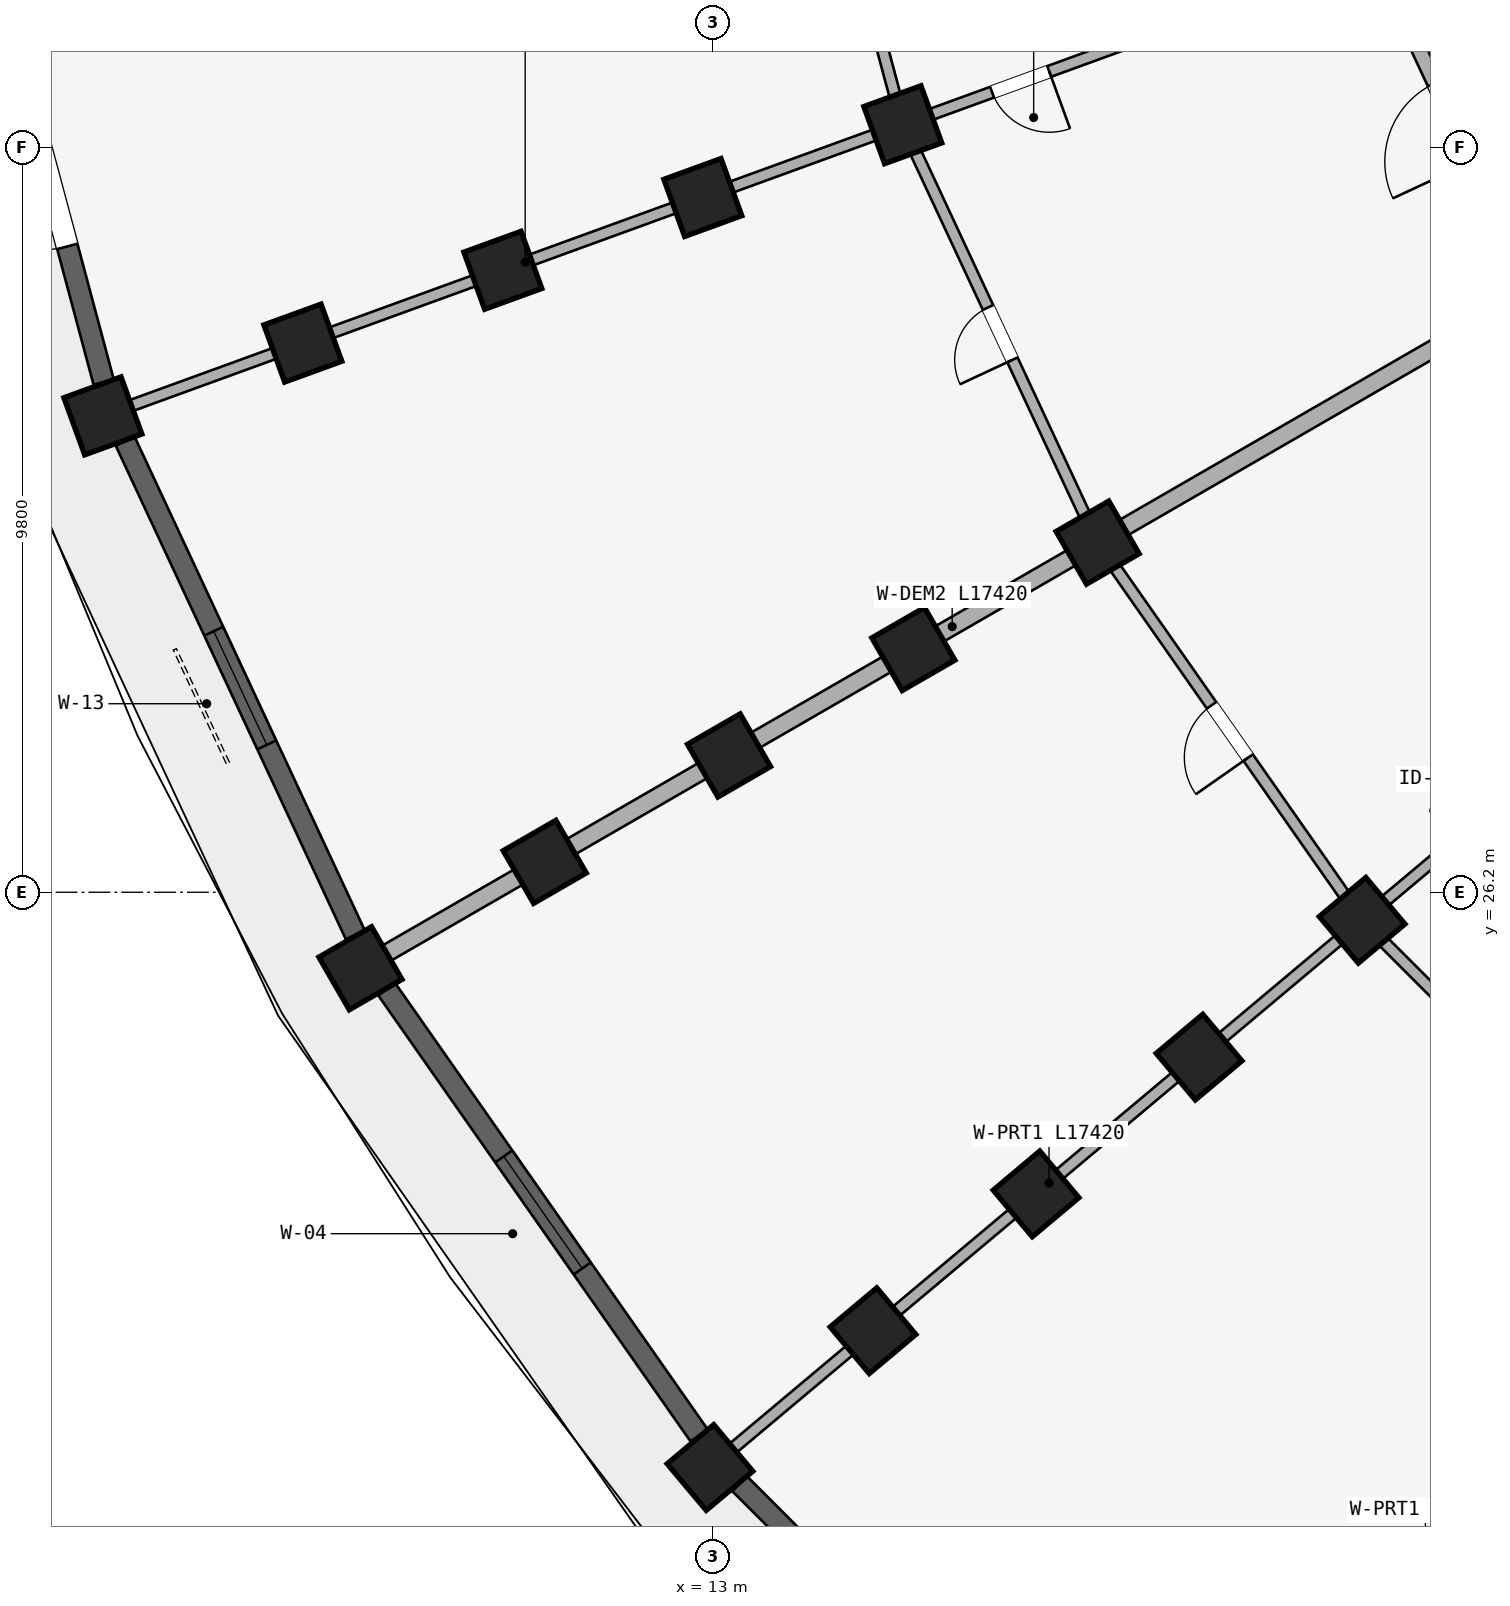
"""IFC4 building model, lengths in metres.
Left out: names, types, materials, properties, quantities, classifications, styles, units other than length and angle.
Written with IfcOpenShell. Run it as: python <this file> out.ifc"""

import sys

from ifc_helpers import new_model, si_unit, direction, frame, frame_2d, origin, origin_2d, place, context, subcontext, project, spatial, rectangle, extrude, element, fill, save


model = new_model("IFC4")
c1 = context("Model", 3, precision=1e-05, world=origin(), true_north=direction((0.0, 1.0)))
c2 = subcontext(c1, "Body", "Model", "MODEL_VIEW")
j1 = project(units=[si_unit("LENGTHUNIT", "METRE"), si_unit("PLANEANGLEUNIT", "RADIAN")], contexts=[c1])
p1 = place(None, origin())
s1 = spatial("IfcSite", under=j1, at=p1, CompositionType="ELEMENT")
p2 = place(p1, origin())
s2 = spatial("IfcBuilding", under=s1, at=p2, CompositionType="ELEMENT")
p3 = place(p2, frame((0.0, 0.0, 8.7)))
s3 = spatial("IfcBuildingStorey", under=s2, at=p3, CompositionType="ELEMENT", Elevation=8.7)
for number, where, z_axis, x_axis in (
    (1, (21.542, 25.831, 0.0), (0.0, 0.0, 1.0), (-0.643, 0.766, 0.0)),
    (2, (19.397, 24.031, 0.0), (0.0, 0.0, 1.0), (-0.643, 0.766, 0.0)),
    (3, (17.252, 22.231, 0.0), (0.0, 0.0, 1.0), (-0.643, 0.766, 0.0)),
    (4, (15.107, 20.432, 0.0), (0.0, 0.0, 1.0), (-0.643, 0.766, 0.0)),
    (5, (12.962, 18.632, 0.0), (0.0, 0.0, 1.0), (-0.643, 0.766, 0.0)),
    (6, (18.062, 30.8, 0.0), (0.0, 0.0, 1.0), (-0.5, 0.866, 0.0)),
    (7, (15.637, 29.4, 0.0), (0.0, 0.0, 1.0), (-0.5, 0.866, 0.0)),
    (8, (13.213, 28.0, 0.0), (0.0, 0.0, 1.0), (-0.5, 0.866, 0.0)),
    (9, (10.788, 26.6, 0.0), (0.0, 0.0, 1.0), (-0.5, 0.866, 0.0)),
    (10, (8.363, 25.2, 0.0), (0.0, 0.0, 1.0), (-0.5, 0.866, 0.0)),
    (11, (15.499, 36.298, 0.0), (0.0, 0.0, 1.0), (-0.342, 0.94, 0.0)),
    (12, (12.868, 35.34, 0.0), (0.0, 0.0, 1.0), (-0.342, 0.94, 0.0)),
    (13, (10.236, 34.382, 0.0), (0.0, 0.0, 1.0), (-0.342, 0.94, 0.0)),
    (14, (7.605, 33.425, 0.0), (0.0, 0.0, 1.0), (-0.342, 0.94, 0.0)),
    (15, (4.974, 32.467, 0.0), (0.0, 0.0, 1.0), (-0.342, 0.94, 0.0)),
):
    element("IfcColumn", number, at=place(p3, frame(where, z_axis=z_axis, x_axis=x_axis)), inside=s3, PredefinedType="COLUMN", context=c2, shape_type="SweptSolid", body=[
        extrude(rectangle(XDim=0.8, YDim=0.8, at=origin_2d()), origin(), (0.0, 0.0, 1.0), 2.93),
    ])
p4 = place(p3, frame((23.778, 34.1, 0.0), z_axis=(0.0, 0.0, 1.0), x_axis=(-0.422629854778, 0.906302381024, 0.0)))
e16 = element("IfcWall", 16, at=p4, inside=s3, PredefinedType="STANDARD", context=c2, shape_type="SweptSolid", body=[
    extrude(rectangle(XDim=4.915, YDim=0.2, at=frame_2d((2.458, 0.0))), origin(), (0.0, 0.0, 1.0), 2.372),
])
p5 = place(p4, frame((1.888, 0.0, 0.0)))
e17 = element("IfcOpeningElement", 17, at=p5, cuts=e16, PredefinedType="OPENING", context=c2, shape_type="SweptSolid", body=[
    extrude(rectangle(XDim=1.14, YDim=2.15, at=frame_2d((0.57, 1.075))), frame((0.0, 0.11, 0.0), z_axis=(0.0, -1.0, 0.0), x_axis=(1.0, 0.0, 0.0)), (0.0, 0.0, 1.0), 0.22),
])
p6 = place(p3, frame((30.009, 26.521, 0.0), z_axis=(0.0, 0.0, 1.0), x_axis=(-0.642784757967, -0.766046835987, 0.0)))
e18 = element("IfcWall", 18, at=p6, inside=s3, PredefinedType="PARTITIONING", context=c2, shape_type="SweptSolid", body=[
    extrude(rectangle(XDim=17.42, YDim=0.15, at=frame_2d((8.71, 0.0))), origin(), (0.0, 0.0, 1.0), 2.372),
])
p7 = place(p6, frame((4.45, 0.0, 0.0)))
e19 = element("IfcOpeningElement", 19, at=p7, cuts=e18, PredefinedType="OPENING", context=c2, shape_type="SweptSolid", body=[
    extrude(rectangle(XDim=0.8, YDim=2.1, at=frame_2d((0.4, 1.05))), frame((0.0, 0.085, 0.0), z_axis=(0.0, -1.0, 0.0), x_axis=(1.0, 0.0, 0.0)), (0.0, 0.0, 1.0), 0.17),
])
p8 = place(p3, frame((26.521, 30.009, 0.0), z_axis=(0.0, 0.0, 1.0), x_axis=(-0.766046835987, -0.642784757967, 0.0)))
e20 = element("IfcWall", 20, at=p8, inside=s3, PredefinedType="PARTITIONING", context=c2, shape_type="SweptSolid", body=[
    extrude(rectangle(XDim=17.42, YDim=0.15, at=frame_2d((8.71, 0.0))), origin(), (0.0, 0.0, 1.0), 2.372),
])
p9 = place(p8, frame((4.45, 0.0, 0.0)))
e21 = element("IfcOpeningElement", 21, at=p9, cuts=e20, PredefinedType="OPENING", context=c2, shape_type="SweptSolid", body=[
    extrude(rectangle(XDim=0.8, YDim=2.1, at=frame_2d((0.4, 1.05))), frame((0.0, 0.085, 0.0), z_axis=(0.0, -1.0, 0.0), x_axis=(1.0, 0.0, 0.0)), (0.0, 0.0, 1.0), 0.17),
])
p10 = place(p3, frame((23.691, 34.05, 0.0), z_axis=(0.0, 0.0, 1.0), x_axis=(-0.866026648973, -0.499997843263, 0.0)))
e22 = element("IfcWall", 22, at=p10, inside=s3, PredefinedType="STANDARD", context=c2, shape_type="SweptSolid", body=[
    extrude(rectangle(XDim=17.42, YDim=0.23, at=frame_2d((8.71, 0.0))), origin(), (0.0, 0.0, 1.0), 2.372),
])
p11 = place(p3, frame((21.607, 38.521, 0.0), z_axis=(0.0, 0.0, 1.0), x_axis=(-0.939691901159, -0.342022120477, 0.0)))
e23 = element("IfcWall", 23, at=p11, inside=s3, PredefinedType="PARTITIONING", context=c2, shape_type="SweptSolid", body=[
    extrude(rectangle(XDim=17.42, YDim=0.15, at=frame_2d((8.71, 0.0))), origin(), (0.0, 0.0, 1.0), 2.372),
])
p12 = place(p11, frame((4.45, 0.0, 0.0)))
e24 = element("IfcOpeningElement", 24, at=p12, cuts=e23, PredefinedType="OPENING", context=c2, shape_type="SweptSolid", body=[
    extrude(rectangle(XDim=0.8, YDim=2.1, at=frame_2d((0.4, 1.05))), frame((0.0, 0.085, 0.0), z_axis=(0.0, -1.0, 0.0), x_axis=(1.0, 0.0, 0.0)), (0.0, 0.0, 1.0), 0.17),
])
p13 = place(p3, frame((25.831, 21.542, 0.0), z_axis=(0.0, 0.0, 1.0), x_axis=(-0.707106781187, 0.707106781187, 0.0)))
e25 = element("IfcWall", 25, at=p13, inside=s3, PredefinedType="PLUMBINGWALL", context=c2, shape_type="SweptSolid", body=[
    extrude(rectangle(XDim=6.066, YDim=0.15, at=frame_2d((3.033, 0.0))), origin(), (0.0, 0.0, 1.0), 2.372),
])
p14 = place(p13, frame((2.633, 0.0, 0.0)))
e26 = element("IfcOpeningElement", 26, at=p14, cuts=e25, PredefinedType="OPENING", context=c2, shape_type="SweptSolid", body=[
    extrude(rectangle(XDim=0.8, YDim=2.1, at=frame_2d((0.4, 1.05))), frame((0.0, 0.085, 0.0), z_axis=(0.0, -1.0, 0.0), x_axis=(1.0, 0.0, 0.0)), (0.0, 0.0, 1.0), 0.17),
])
p15 = place(p3, frame((21.542, 25.831, 0.0), z_axis=(0.0, 0.0, 1.0), x_axis=(-0.573594691504, 0.81913926159, 0.0)))
e27 = element("IfcWall", 27, at=p15, inside=s3, PredefinedType="PLUMBINGWALL", context=c2, shape_type="SweptSolid", body=[
    extrude(rectangle(XDim=6.066, YDim=0.15, at=frame_2d((3.033, 0.0))), origin(), (0.0, 0.0, 1.0), 2.372),
])
p16 = place(p15, frame((2.613, 0.0, 0.0)))
e28 = element("IfcOpeningElement", 28, at=p16, cuts=e27, PredefinedType="OPENING", context=c2, shape_type="SweptSolid", body=[
    extrude(rectangle(XDim=0.84, YDim=2.1, at=frame_2d((0.42, 1.05))), frame((0.0, 0.085, 0.0), z_axis=(0.0, -1.0, 0.0), x_axis=(1.0, 0.0, 0.0)), (0.0, 0.0, 1.0), 0.17),
])
p17 = place(p3, frame((18.062, 30.8, 0.0), z_axis=(0.0, 0.0, 1.0), x_axis=(-0.42260781991, 0.906312656069, 0.0)))
e29 = element("IfcWall", 29, at=p17, inside=s3, PredefinedType="PLUMBINGWALL", context=c2, shape_type="SweptSolid", body=[
    extrude(rectangle(XDim=6.066, YDim=0.15, at=frame_2d((3.033, 0.0))), origin(), (0.0, 0.0, 1.0), 2.372),
])
p18 = place(p17, frame((2.653, 0.0, 0.0)))
e30 = element("IfcOpeningElement", 30, at=p18, cuts=e29, PredefinedType="OPENING", context=c2, shape_type="SweptSolid", body=[
    extrude(rectangle(XDim=0.76, YDim=2.05, at=frame_2d((0.38, 1.025))), frame((0.0, 0.085, 0.0), z_axis=(0.0, -1.0, 0.0), x_axis=(1.0, 0.0, 0.0)), (0.0, 0.0, 1.0), 0.17),
])
p19 = place(p3, frame((15.499, 36.298, 0.0), z_axis=(0.0, 0.0, 1.0), x_axis=(-0.258827283048, 0.965923618901, 0.0)))
e31 = element("IfcWall", 31, at=p19, inside=s3, PredefinedType="PLUMBINGWALL", context=c2, shape_type="SweptSolid", body=[
    extrude(rectangle(XDim=6.066, YDim=0.15, at=frame_2d((3.033, 0.0))), origin(), (0.0, 0.0, 1.0), 2.372),
])
p20 = place(p19, frame((2.633, 0.0, 0.0)))
e32 = element("IfcOpeningElement", 32, at=p20, cuts=e31, PredefinedType="OPENING", context=c2, shape_type="SweptSolid", body=[
    extrude(rectangle(XDim=0.8, YDim=2.1, at=frame_2d((0.4, 1.05))), frame((0.0, 0.085, 0.0), z_axis=(0.0, -1.0, 0.0), x_axis=(1.0, 0.0, 0.0)), (0.0, 0.0, 1.0), 0.17),
])
p21 = place(p3, frame((18.418, 13.352, 0.0), z_axis=(0.0, 0.0, 1.0), x_axis=(-0.707106781187, 0.707106781187, 0.0)))
e33 = element("IfcWall", 33, at=p21, inside=s3, PredefinedType="STANDARD", context=c2, shape_type="SweptSolid", body=[
    extrude(rectangle(XDim=7.164, YDim=0.275, at=frame_2d((3.582, 0.0))), origin(), (0.0, 0.0, 1.0), 2.472),
])
p22 = place(p21, frame((4.69, 0.0, 0.422)))
e34 = element("IfcOpeningElement", 34, at=p22, cuts=e33, PredefinedType="OPENING", context=c2, shape_type="SweptSolid", body=[
    extrude(rectangle(XDim=1.2, YDim=1.5, at=frame_2d((0.6, 0.75))), frame((0.0, 0.147, 0.0), z_axis=(0.0, -1.0, 0.0), x_axis=(1.0, 0.0, 0.0)), (0.0, 0.0, 1.0), 0.295),
])
p23 = place(p21, frame((1.847, 0.0, 0.0)))
e35 = element("IfcOpeningElement", 35, at=p23, cuts=e33, PredefinedType="OPENING", context=c2, shape_type="SweptSolid", body=[
    extrude(rectangle(XDim=1.32, YDim=2.15, at=frame_2d((0.66, 1.075))), frame((0.0, 0.147, 0.0), z_axis=(0.0, -1.0, 0.0), x_axis=(1.0, 0.0, 0.0)), (0.0, 0.0, 1.0), 0.295),
])
p24 = place(p3, frame((12.819, 19.053, 0.0), z_axis=(0.0, 0.0, 1.0), x_axis=(-0.573562972382, 0.819161471697, 0.0)))
e36 = element("IfcWall", 36, at=p24, inside=s3, PredefinedType="STANDARD", context=c2, shape_type="SweptSolid", body=[
    extrude(rectangle(XDim=7.164, YDim=0.275, at=frame_2d((3.582, 0.0))), origin(), (0.0, 0.0, 1.0), 2.472),
])
p25 = place(p24, frame((2.682, 0.0, 0.622)))
e37 = element("IfcOpeningElement", 37, at=p25, cuts=e36, PredefinedType="OPENING", context=c2, shape_type="SweptSolid", body=[
    extrude(rectangle(XDim=1.8, YDim=1.65, at=frame_2d((0.9, 0.825))), frame((0.0, 0.147, 0.0), z_axis=(0.0, -1.0, 0.0), x_axis=(1.0, 0.0, 0.0)), (0.0, 0.0, 1.0), 0.295),
])
p26 = place(p3, frame((8.296, 25.64, 0.0), z_axis=(0.0, 0.0, 1.0), x_axis=(-0.422633596215, 0.906300636296, 0.0)))
e38 = element("IfcWall", 38, at=p26, inside=s3, PredefinedType="STANDARD", context=c2, shape_type="SweptSolid", body=[
    extrude(rectangle(XDim=7.164, YDim=0.275, at=frame_2d((3.582, 0.0))), origin(), (0.0, 0.0, 1.0), 2.472),
])
p27 = place(p26, frame((2.757, 0.0, 0.522)))
e39 = element("IfcOpeningElement", 39, at=p27, cuts=e38, PredefinedType="OPENING", context=c2, shape_type="SweptSolid", body=[
    extrude(rectangle(XDim=1.65, YDim=1.75, at=frame_2d((0.825, 0.875))), frame((0.0, 0.147, 0.0), z_axis=(0.0, -1.0, 0.0), x_axis=(1.0, 0.0, 0.0)), (0.0, 0.0, 1.0), 0.295),
])
p28 = place(p3, frame((4.984, 32.912, 0.0), z_axis=(0.0, 0.0, 1.0), x_axis=(-0.258826933296, 0.965923712619, 0.0)))
e40 = element("IfcWall", 40, at=p28, inside=s3, PredefinedType="STANDARD", context=c2, shape_type="SweptSolid", body=[
    extrude(rectangle(XDim=7.164, YDim=0.275, at=frame_2d((3.582, 0.0))), origin(), (0.0, 0.0, 1.0), 2.472),
])
p29 = place(p28, frame((4.69, 0.0, 0.322)))
e41 = element("IfcOpeningElement", 41, at=p29, cuts=e40, PredefinedType="OPENING", context=c2, shape_type="SweptSolid", body=[
    extrude(rectangle(XDim=1.2, YDim=1.5, at=frame_2d((0.6, 0.75))), frame((0.0, 0.147, 0.0), z_axis=(0.0, -1.0, 0.0), x_axis=(1.0, 0.0, 0.0)), (0.0, 0.0, 1.0), 0.295),
])
p30 = place(p28, frame((1.847, 0.0, 0.0)))
e42 = element("IfcOpeningElement", 42, at=p30, cuts=e40, PredefinedType="OPENING", context=c2, shape_type="SweptSolid", body=[
    extrude(rectangle(XDim=1.32, YDim=2.15, at=frame_2d((0.66, 1.075))), frame((0.0, 0.147, 0.0), z_axis=(0.0, -1.0, 0.0), x_axis=(1.0, 0.0, 0.0)), (0.0, 0.0, 1.0), 0.295),
])
p31 = place(p25, origin())
e43 = element("IfcWindow", 43, at=p31, inside=s3, PartitioningType="DOUBLE_PANEL_VERTICAL", PredefinedType="WINDOW", context=c2, shape_type="SweptSolid", body=[
    extrude(rectangle(XDim=1.8, YDim=1.65, at=frame_2d((0.9, 0.825))), frame((0.0, 0.03, 0.0), z_axis=(0.0, -1.0, 0.0), x_axis=(1.0, 0.0, 0.0)), (0.0, 0.0, 1.0), 0.06),
])
fill(e37, e43)
p32 = place(p27, origin())
e44 = element("IfcWindow", 44, at=p32, inside=s3, PartitioningType="DOUBLE_PANEL_VERTICAL", PredefinedType="WINDOW", context=c2, shape_type="SweptSolid", body=[
    extrude(rectangle(XDim=1.65, YDim=1.75, at=frame_2d((0.825, 0.875))), frame((0.0, 0.03, 0.0), z_axis=(0.0, -1.0, 0.0), x_axis=(1.0, 0.0, 0.0)), (0.0, 0.0, 1.0), 0.06),
])
fill(e39, e44)
p33 = place(p12, frame((0.8, 0.0, 0.0), z_axis=(0.0, 0.0, 1.0), x_axis=(-1.0, 0.0, 0.0)))
e45 = element("IfcDoor", 45, at=p33, inside=s3, OperationType="SINGLE_SWING_RIGHT", PredefinedType="DOOR", context=c2, shape_type="SweptSolid", body=[
    extrude(rectangle(XDim=0.8, YDim=2.1, at=frame_2d((0.4, 1.05))), frame((0.0, 0.025, 0.0), z_axis=(0.0, -1.0, 0.0), x_axis=(1.0, 0.0, 0.0)), (0.0, 0.0, 1.0), 0.05),
])
fill(e24, e45)
p34 = place(p16, frame((0.84, 0.0, 0.0), z_axis=(0.0, 0.0, 1.0), x_axis=(-1.0, 0.0, 0.0)))
e46 = element("IfcDoor", 46, at=p34, inside=s3, OperationType="SINGLE_SWING_RIGHT", PredefinedType="DOOR", context=c2, shape_type="SweptSolid", body=[
    extrude(rectangle(XDim=0.84, YDim=2.1, at=frame_2d((0.42, 1.05))), frame((0.0, 0.025, 0.0), z_axis=(0.0, -1.0, 0.0), x_axis=(1.0, 0.0, 0.0)), (0.0, 0.0, 1.0), 0.05),
])
fill(e28, e46)
p35 = place(p18, frame((0.76, 0.0, 0.0), z_axis=(0.0, 0.0, 1.0), x_axis=(-1.0, 0.0, 0.0)))
e47 = element("IfcDoor", 47, at=p35, inside=s3, OperationType="SINGLE_SWING_RIGHT", PredefinedType="DOOR", context=c2, shape_type="SweptSolid", body=[
    extrude(rectangle(XDim=0.76, YDim=2.05, at=frame_2d((0.38, 1.025))), frame((0.0, 0.025, 0.0), z_axis=(0.0, -1.0, 0.0), x_axis=(1.0, 0.0, 0.0)), (0.0, 0.0, 1.0), 0.05),
])
fill(e30, e47)
p36 = place(p30, origin())
e48 = element("IfcDoor", 48, at=p36, inside=s3, OperationType="SINGLE_SWING_RIGHT", PredefinedType="DOOR", context=c2, shape_type="SweptSolid", body=[
    extrude(rectangle(XDim=1.32, YDim=2.15, at=frame_2d((0.66, 1.075))), frame((0.0, 0.025, 0.0), z_axis=(0.0, -1.0, 0.0), x_axis=(1.0, 0.0, 0.0)), (0.0, 0.0, 1.0), 0.05),
])
fill(e42, e48)
save(model, sys.argv[1])
